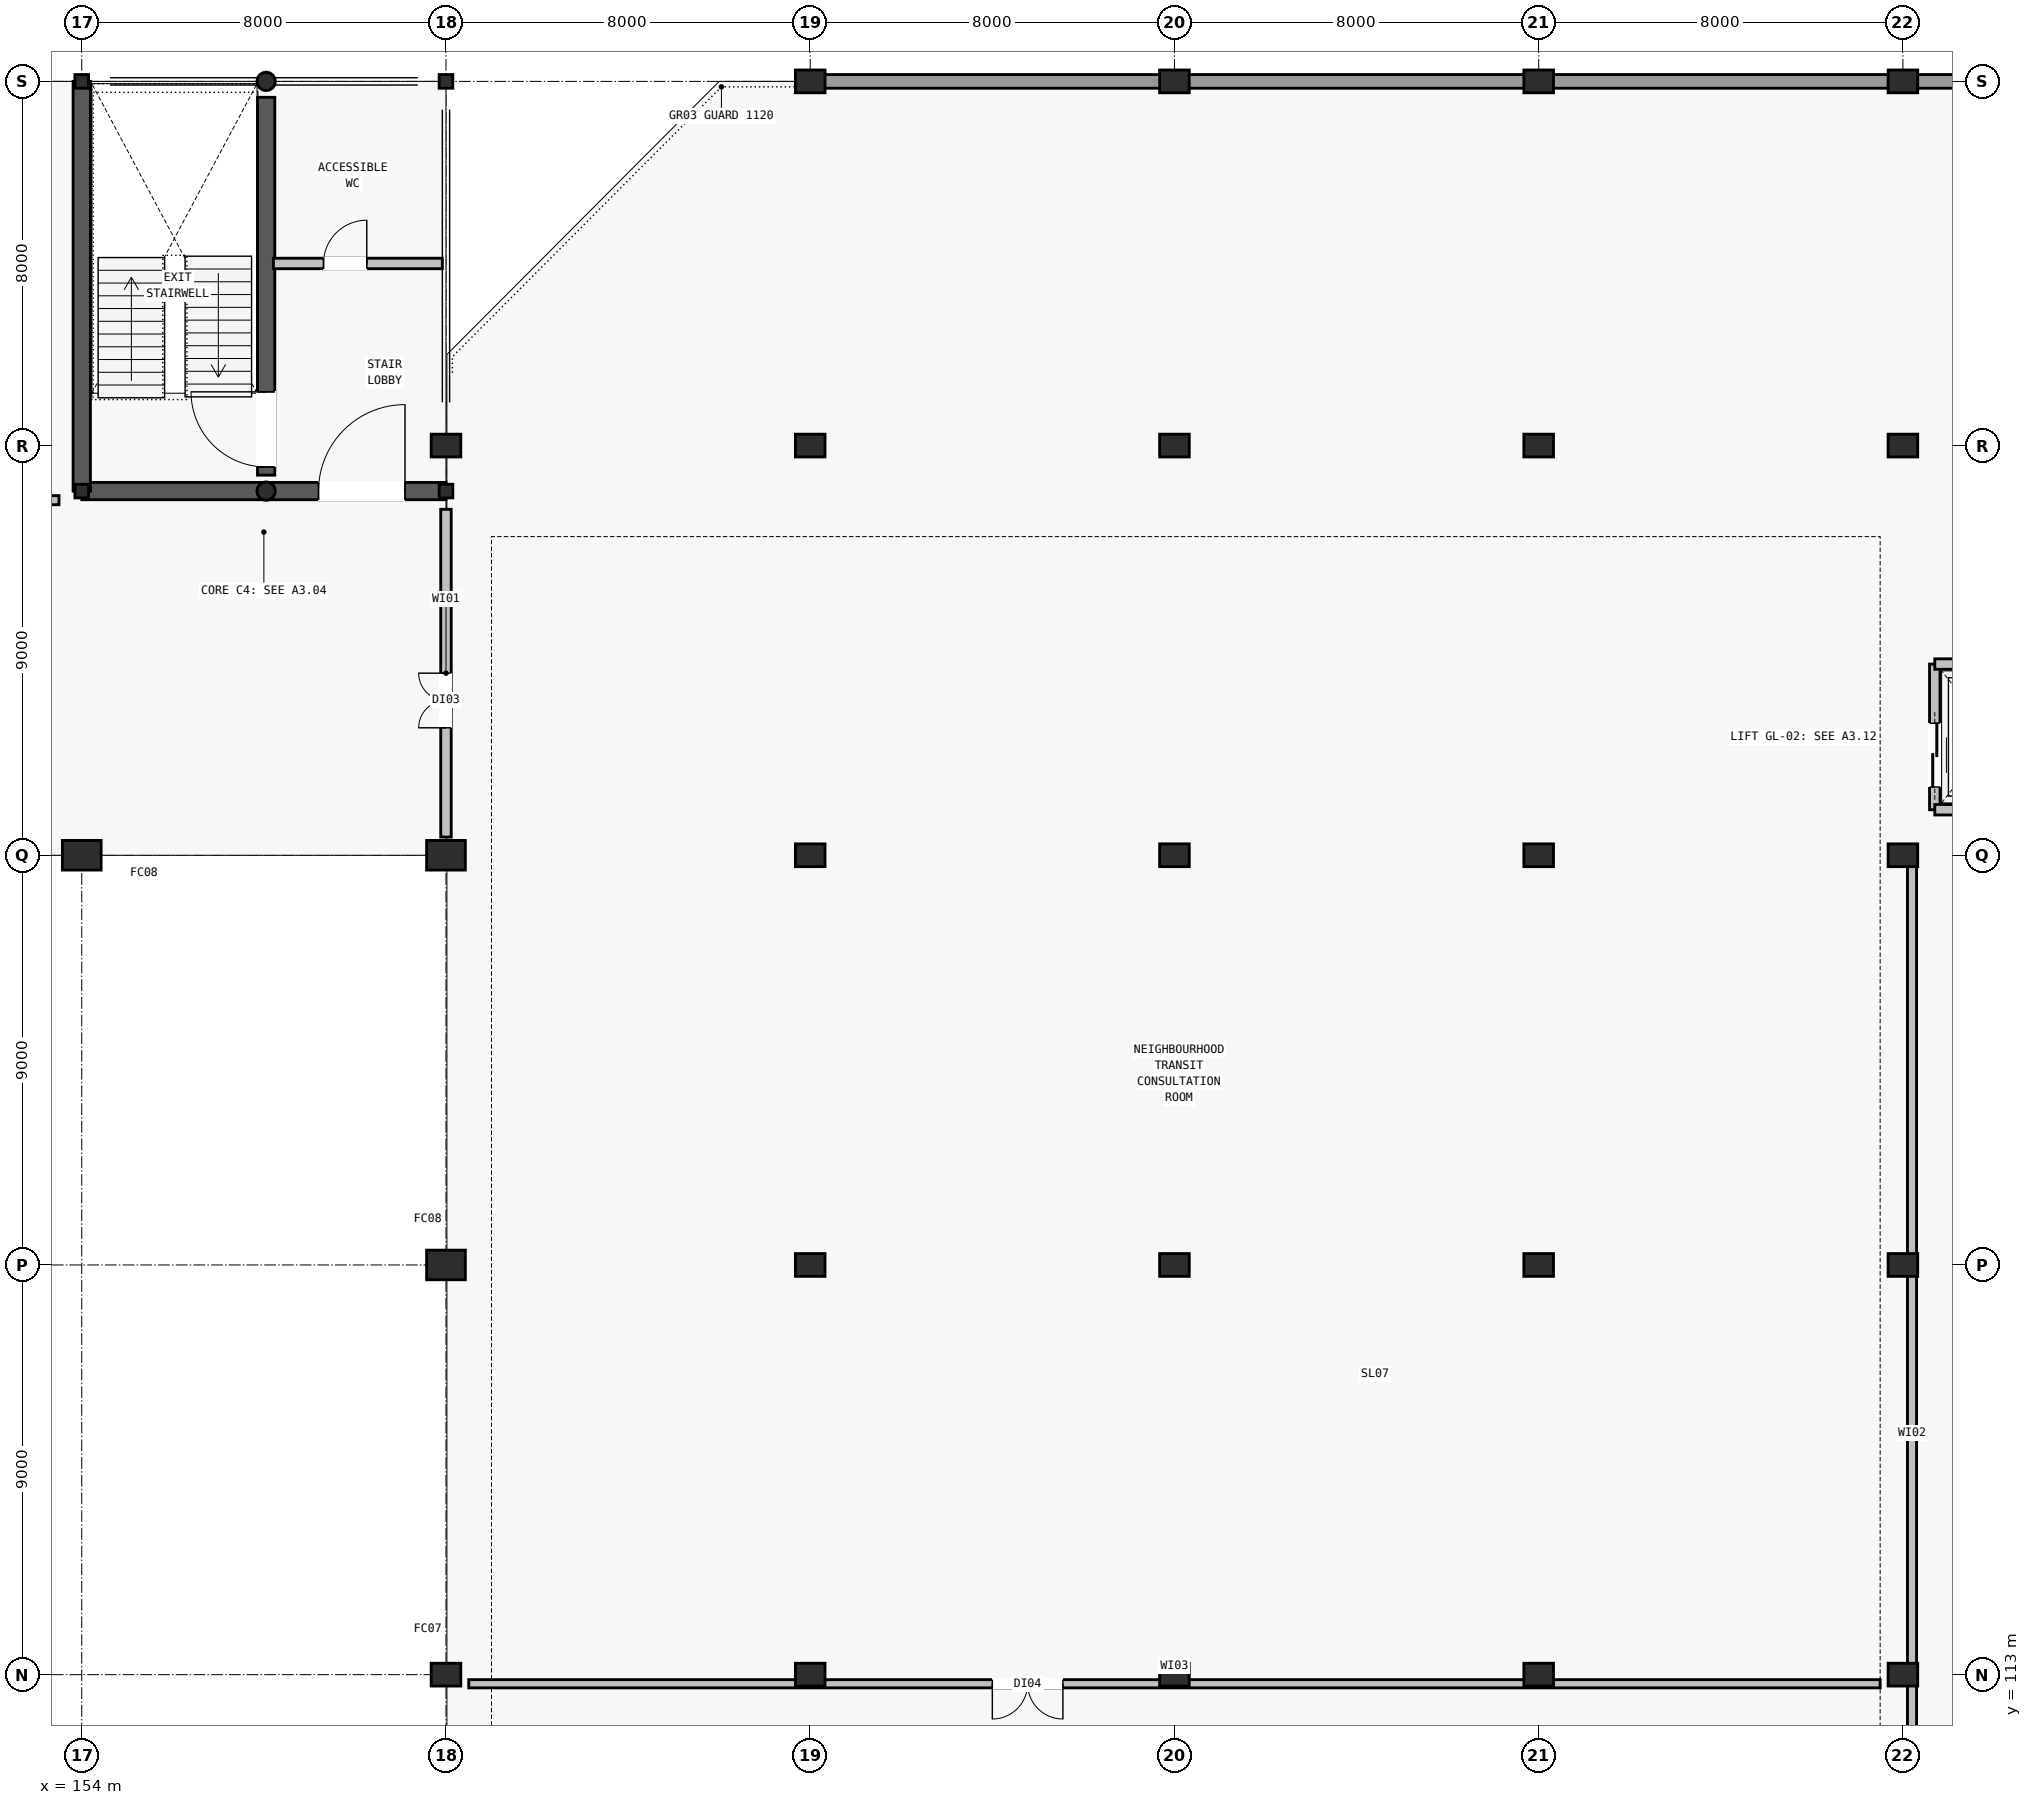
"""IFC4 building model, lengths in metres.
Left out: names, types, materials, properties, quantities, classifications, styles, units other than length and angle.
Written with IfcOpenShell. Run it as: python <this file> out.ifc"""

import sys

from ifc_helpers import new_model, si_unit, direction, frame, frame_2d, origin, origin_2d, place, context, subcontext, project, spatial, rectangle, hollow_circle, i_section, extrude, element, fill, save


model = new_model("IFC4")
c1 = context("Model", 3, precision=1e-05, world=origin(), true_north=direction((0.0, 1.0)))
c2 = subcontext(c1, "Body", "Model", "MODEL_VIEW")
j1 = project(units=[si_unit("LENGTHUNIT", "METRE"), si_unit("PLANEANGLEUNIT", "RADIAN")], contexts=[c1])
p1 = place(None, origin())
s1 = spatial("IfcSite", under=j1, at=p1, CompositionType="ELEMENT")
p2 = place(p1, origin())
s2 = spatial("IfcBuilding", under=s1, at=p2, CompositionType="ELEMENT")
p3 = place(p2, frame((0.0, 0.0, 17.3)))
s3 = spatial("IfcBuildingStorey", under=s2, at=p3, CompositionType="ELEMENT", Elevation=17.3)
for number, where, z_axis, x_axis in (
    (1, (154.0, 148.0, 0.0), (0.0, 0.0, 1.0), (1.0, 0.0, 0.0)),
    (2, (162.0, 148.0, 0.0), (0.0, 0.0, 1.0), (1.0, 0.0, 0.0)),
    (3, (154.0, 139.0, 0.0), (0.0, 0.0, 1.0), (1.0, 0.0, 0.0)),
    (4, (162.0, 139.0, 0.0), (0.0, 0.0, 1.0), (1.0, 0.0, 0.0)),
):
    element("IfcColumn", number, at=place(p3, frame(where, z_axis=z_axis, x_axis=x_axis)), inside=s3, PredefinedType="COLUMN", context=c2, shape_type="SweptSolid", body=[
        extrude(i_section(OverallWidth=0.3, OverallDepth=0.3, WebThickness=0.01, FlangeThickness=0.015, FilletRadius=0.018, at=origin_2d()), origin(), (0.0, 0.0, 1.0), 3.9),
    ])
for number, where, z_axis, x_axis in (
    (5, (158.05, 139.0, 0.0), (0.0, 0.0, 1.0), (1.0, 0.0, 0.0)),
    (6, (158.05, 148.0, 0.0), (0.0, 0.0, 1.0), (1.0, 0.0, 0.0)),
):
    element("IfcColumn", number, at=place(p3, frame(where, z_axis=z_axis, x_axis=x_axis)), inside=s3, PredefinedType="COLUMN", context=c2, shape_type="SweptSolid", body=[
        extrude(hollow_circle(Radius=0.203, WallThickness=0.014, at=origin_2d()), origin(), (0.0, 0.0, 1.0), 3.9),
    ])
for number, where, z_axis, x_axis in (
    (7, (154.0, 131.0, 0.0), (0.0, 0.0, 1.0), (1.0, 0.0, 0.0)),
    (8, (162.0, 122.0, 0.0), (0.0, 0.0, 1.0), (1.0, 0.0, 0.0)),
    (9, (162.0, 131.0, 0.0), (0.0, 0.0, 1.0), (1.0, 0.0, 0.0)),
):
    element("IfcColumn", number, at=place(p3, frame(where, z_axis=z_axis, x_axis=x_axis)), inside=s3, PredefinedType="COLUMN", context=c2, shape_type="SweptSolid", body=[
        extrude(rectangle(XDim=0.85, YDim=0.65, at=origin_2d()), origin(), (0.0, 0.0, 1.0), 3.9),
    ])
for number, where, z_axis, x_axis in (
    (10, (162.0, 113.0, 0.0), (0.0, 0.0, 1.0), (1.0, 0.0, 0.0)),
    (11, (162.0, 140.0, 0.0), (0.0, 0.0, 1.0), (1.0, 0.0, 0.0)),
    (12, (170.0, 113.0, 0.0), (0.0, 0.0, 1.0), (1.0, 0.0, 0.0)),
    (13, (170.0, 122.0, 0.0), (0.0, 0.0, 1.0), (1.0, 0.0, 0.0)),
    (14, (170.0, 131.0, 0.0), (0.0, 0.0, 1.0), (1.0, 0.0, 0.0)),
    (15, (170.0, 140.0, 0.0), (0.0, 0.0, 1.0), (1.0, 0.0, 0.0)),
    (16, (170.0, 148.0, 0.0), (0.0, 0.0, 1.0), (1.0, 0.0, 0.0)),
    (17, (178.0, 113.0, 0.0), (0.0, 0.0, 1.0), (1.0, 0.0, 0.0)),
    (18, (178.0, 122.0, 0.0), (0.0, 0.0, 1.0), (1.0, 0.0, 0.0)),
    (19, (178.0, 131.0, 0.0), (0.0, 0.0, 1.0), (1.0, 0.0, 0.0)),
    (20, (178.0, 140.0, 0.0), (0.0, 0.0, 1.0), (1.0, 0.0, 0.0)),
    (21, (178.0, 148.0, 0.0), (0.0, 0.0, 1.0), (1.0, 0.0, 0.0)),
    (22, (186.0, 113.0, 0.0), (0.0, 0.0, 1.0), (1.0, 0.0, 0.0)),
    (23, (186.0, 122.0, 0.0), (0.0, 0.0, 1.0), (1.0, 0.0, 0.0)),
    (24, (186.0, 131.0, 0.0), (0.0, 0.0, 1.0), (1.0, 0.0, 0.0)),
    (25, (186.0, 140.0, 0.0), (0.0, 0.0, 1.0), (1.0, 0.0, 0.0)),
    (26, (186.0, 148.0, 0.0), (0.0, 0.0, 1.0), (1.0, 0.0, 0.0)),
    (27, (194.0, 113.0, 0.0), (0.0, 0.0, 1.0), (1.0, 0.0, 0.0)),
    (28, (194.0, 122.0, 0.0), (0.0, 0.0, 1.0), (1.0, 0.0, 0.0)),
    (29, (194.0, 131.0, 0.0), (0.0, 0.0, 1.0), (1.0, 0.0, 0.0)),
    (30, (194.0, 140.0, 0.0), (0.0, 0.0, 1.0), (1.0, 0.0, 0.0)),
    (31, (194.0, 148.0, 0.0), (0.0, 0.0, 1.0), (1.0, 0.0, 0.0)),
):
    element("IfcColumn", number, at=place(p3, frame(where, z_axis=z_axis, x_axis=x_axis)), inside=s3, PredefinedType="COLUMN", context=c2, shape_type="SweptSolid", body=[
        extrude(rectangle(XDim=0.65, YDim=0.5, at=origin_2d()), origin(), (0.0, 0.0, 1.0), 3.9),
    ])
for number, where, z_axis, x_axis in (
    (32, (177.695, 148.0, 0.0), (0.0, 0.0, 1.0), (-1.0, 0.0, 0.0)),
    (33, (185.695, 148.0, 0.0), (0.0, 0.0, 1.0), (-1.0, 0.0, 0.0)),
    (34, (193.695, 148.0, 0.0), (0.0, 0.0, 1.0), (-1.0, 0.0, 0.0)),
    (35, (201.695, 148.0, 0.0), (0.0, 0.0, 1.0), (-1.0, 0.0, 0.0)),
):
    element("IfcWall", number, at=place(p3, frame(where, z_axis=z_axis, x_axis=x_axis)), inside=s3, PredefinedType="STANDARD", context=c2, shape_type="SweptSolid", body=[
        extrude(rectangle(XDim=7.39, YDim=0.3, at=frame_2d((3.695, 0.0))), origin(), (0.0, 0.0, 1.0), 2.48),
    ])
p4 = place(p3, frame((154.0, 139.0, 0.0), z_axis=(0.0, 0.0, 1.0), x_axis=(1.0, 0.0, 0.0)))
e36 = element("IfcWall", 36, at=p4, inside=s3, PredefinedType="SHEAR", context=c2, shape_type="SweptSolid", body=[
    extrude(rectangle(XDim=8.0, YDim=0.38, at=frame_2d((4.0, 0.0))), origin(), (0.0, 0.0, 1.0), 3.62),
])
p5 = place(p4, frame((5.2, 0.0, 0.0)))
e37 = element("IfcOpeningElement", 37, at=p5, cuts=e36, PredefinedType="OPENING", context=c2, shape_type="SweptSolid", body=[
    extrude(rectangle(XDim=1.9, YDim=2.3, at=frame_2d((0.95, 1.15))), frame((0.0, 0.2, 0.0), z_axis=(0.0, -1.0, 0.0), x_axis=(1.0, 0.0, 0.0)), (0.0, 0.0, 1.0), 0.4),
])
p6 = place(p3, frame((154.0, 148.0, 0.0), z_axis=(0.0, 0.0, 1.0), x_axis=(0.0, -1.0, 0.0)))
e38 = element("IfcWall", 38, at=p6, inside=s3, PredefinedType="SHEAR", context=c2, shape_type="SweptSolid", body=[
    extrude(rectangle(XDim=9.0, YDim=0.38, at=frame_2d((4.5, 0.0))), origin(), (0.0, 0.0, 1.0), 3.62),
])
p7 = place(p3, frame((158.05, 139.35, 0.0), z_axis=(0.0, 0.0, 1.0), x_axis=(0.0, 1.0, 0.0)))
e39 = element("IfcWall", 39, at=p7, inside=s3, PredefinedType="SHEAR", context=c2, shape_type="SweptSolid", body=[
    extrude(rectangle(XDim=8.3, YDim=0.38, at=frame_2d((4.15, 0.0))), origin(), (0.0, 0.0, 1.0), 3.62),
])
p8 = place(p7, frame((0.18, 0.0, 0.0)))
e40 = element("IfcOpeningElement", 40, at=p8, cuts=e39, PredefinedType="OPENING", context=c2, shape_type="SweptSolid", body=[
    extrude(rectangle(XDim=1.65, YDim=2.2, at=frame_2d((0.825, 1.1))), frame((0.0, 0.2, 0.0), z_axis=(0.0, -1.0, 0.0), x_axis=(1.0, 0.0, 0.0)), (0.0, 0.0, 1.0), 0.4),
])
p9 = place(p3, frame((158.21, 144.0, 0.0), z_axis=(0.0, 0.0, 1.0), x_axis=(1.0, 0.0, 0.0)))
e41 = element("IfcWall", 41, at=p9, inside=s3, PredefinedType="PARTITIONING", context=c2, shape_type="SweptSolid", body=[
    extrude(rectangle(XDim=3.71, YDim=0.23, at=frame_2d((1.855, 0.0))), origin(), (0.0, 0.0, 1.0), 2.48),
])
p10 = place(p9, frame((1.1, 0.0, 0.0)))
e42 = element("IfcOpeningElement", 42, at=p10, cuts=e41, PredefinedType="OPENING", context=c2, shape_type="SweptSolid", body=[
    extrude(rectangle(XDim=0.95, YDim=2.1, at=frame_2d((0.475, 1.05))), frame((0.0, 0.125, 0.0), z_axis=(0.0, -1.0, 0.0), x_axis=(1.0, 0.0, 0.0)), (0.0, 0.0, 1.0), 0.25),
])
p11 = place(p3, frame((194.7, 132.0, 0.0), z_axis=(0.0, 0.0, 1.0), x_axis=(0.0, 1.0, 0.0)))
e43 = element("IfcWall", 43, at=p11, inside=s3, PredefinedType="PARTITIONING", context=c2, shape_type="SweptSolid", body=[
    extrude(rectangle(XDim=3.2, YDim=0.23, at=frame_2d((1.6, 0.0))), origin(), (0.0, 0.0, 1.0), 2.48),
])
p12 = place(p11, frame((0.5, 0.0, 0.0)))
e44 = element("IfcOpeningElement", 44, at=p12, cuts=e43, PredefinedType="OPENING", context=c2, shape_type="SweptSolid", body=[
    extrude(rectangle(XDim=1.4, YDim=2.3, at=frame_2d((0.7, 1.15))), frame((0.0, 0.125, 0.0), z_axis=(0.0, -1.0, 0.0), x_axis=(1.0, 0.0, 0.0)), (0.0, 0.0, 1.0), 0.25),
])
for number, where, z_axis, x_axis in (
    (45, (194.7, 135.2, 0.0), (0.0, 0.0, 1.0), (1.0, 0.0, 0.0)),
    (46, (197.3, 132.0, 0.0), (0.0, 0.0, 1.0), (-1.0, 0.0, 0.0)),
):
    element("IfcWall", number, at=place(p3, frame(where, z_axis=z_axis, x_axis=x_axis)), inside=s3, PredefinedType="PARTITIONING", context=c2, shape_type="SweptSolid", body=[
        extrude(rectangle(XDim=2.6, YDim=0.23, at=frame_2d((1.3, 0.0))), origin(), (0.0, 0.0, 1.0), 2.48),
    ])
p13 = place(p3, frame((162.0, 131.4, 0.0), z_axis=(0.0, 0.0, 1.0), x_axis=(0.0, 1.0, 0.0)))
e47 = element("IfcWall", 47, at=p13, inside=s3, PredefinedType="PARTITIONING", context=c2, shape_type="SweptSolid", body=[
    extrude(rectangle(XDim=7.2, YDim=0.23, at=frame_2d((3.6, 0.0))), origin(), (0.0, 0.0, 1.0), 2.48),
])
p14 = place(p13, frame((2.4, 0.0, 0.0)))
e48 = element("IfcOpeningElement", 48, at=p14, cuts=e47, PredefinedType="OPENING", context=c2, shape_type="SweptSolid", body=[
    extrude(rectangle(XDim=1.2, YDim=2.2, at=frame_2d((0.6, 1.1))), frame((0.0, 0.125, 0.0), z_axis=(0.0, -1.0, 0.0), x_axis=(1.0, 0.0, 0.0)), (0.0, 0.0, 1.0), 0.25),
])
p15 = place(p3, frame((120.5, 138.8, 0.0), z_axis=(0.0, 0.0, 1.0), x_axis=(1.0, 0.0, 0.0)))
e49 = element("IfcWall", 49, at=p15, inside=s3, PredefinedType="PARTITIONING", context=c2, shape_type="SweptSolid", body=[
    extrude(rectangle(XDim=33.0, YDim=0.2, at=frame_2d((16.5, 0.0))), origin(), (0.0, 0.0, 1.0), 2.48),
])
p16 = place(p15, frame((12.0, 0.0, 0.0)))
e50 = element("IfcOpeningElement", 50, at=p16, cuts=e49, PredefinedType="OPENING", context=c2, shape_type="SweptSolid", body=[
    extrude(rectangle(XDim=1.75, YDim=2.25, at=frame_2d((0.875, 1.125))), frame((0.0, 0.11, 0.0), z_axis=(0.0, -1.0, 0.0), x_axis=(1.0, 0.0, 0.0)), (0.0, 0.0, 1.0), 0.22),
])
p17 = place(p3, frame((162.5, 112.8, 0.0), z_axis=(0.0, 0.0, 1.0), x_axis=(1.0, 0.0, 0.0)))
e51 = element("IfcWall", 51, at=p17, inside=s3, PredefinedType="PARTITIONING", context=c2, shape_type="SweptSolid", body=[
    extrude(rectangle(XDim=31.0, YDim=0.18, at=frame_2d((15.5, 0.0))), origin(), (0.0, 0.0, 1.0), 2.48),
])
p18 = place(p17, frame((11.5, 0.0, 0.0)))
e52 = element("IfcOpeningElement", 52, at=p18, cuts=e51, PredefinedType="OPENING", context=c2, shape_type="SweptSolid", body=[
    extrude(rectangle(XDim=1.55, YDim=2.2, at=frame_2d((0.775, 1.1))), frame((0.0, 0.1, 0.0), z_axis=(0.0, -1.0, 0.0), x_axis=(1.0, 0.0, 0.0)), (0.0, 0.0, 1.0), 0.2),
])
p19 = place(p3, frame((194.2, 86.2, 0.0), z_axis=(0.0, 0.0, 1.0), x_axis=(0.0, 1.0, 0.0)))
e53 = element("IfcWall", 53, at=p19, inside=s3, PredefinedType="PARTITIONING", context=c2, shape_type="SweptSolid", body=[
    extrude(rectangle(XDim=45.0, YDim=0.2, at=frame_2d((22.5, 0.0))), origin(), (0.0, 0.0, 1.0), 2.48),
])
p20 = place(p19, frame((13.5, 0.0, 0.0)))
e54 = element("IfcOpeningElement", 54, at=p20, cuts=e53, PredefinedType="OPENING", context=c2, shape_type="SweptSolid", body=[
    extrude(rectangle(XDim=1.75, YDim=2.25, at=frame_2d((0.875, 1.125))), frame((0.0, 0.11, 0.0), z_axis=(0.0, -1.0, 0.0), x_axis=(1.0, 0.0, 0.0)), (0.0, 0.0, 1.0), 0.22),
])
p21 = place(p5, origin())
e55 = element("IfcDoor", 55, at=p21, inside=s3, OperationType="SINGLE_SWING_RIGHT", PredefinedType="DOOR", context=c2, shape_type="SweptSolid", body=[
    extrude(rectangle(XDim=1.9, YDim=2.3, at=frame_2d((0.95, 1.15))), frame((0.0, 0.025, 0.0), z_axis=(0.0, -1.0, 0.0), x_axis=(1.0, 0.0, 0.0)), (0.0, 0.0, 1.0), 0.05),
])
fill(e37, e55)
p22 = place(p8, origin())
e56 = element("IfcDoor", 56, at=p22, inside=s3, OperationType="SINGLE_SWING_RIGHT", PredefinedType="DOOR", context=c2, shape_type="SweptSolid", body=[
    extrude(rectangle(XDim=1.65, YDim=2.2, at=frame_2d((0.825, 1.1))), frame((0.0, 0.025, 0.0), z_axis=(0.0, -1.0, 0.0), x_axis=(1.0, 0.0, 0.0)), (0.0, 0.0, 1.0), 0.05),
])
fill(e40, e56)
p23 = place(p10, origin())
e57 = element("IfcDoor", 57, at=p23, inside=s3, OperationType="SINGLE_SWING_RIGHT", PredefinedType="DOOR", context=c2, shape_type="SweptSolid", body=[
    extrude(rectangle(XDim=0.95, YDim=2.1, at=frame_2d((0.475, 1.05))), frame((0.0, 0.025, 0.0), z_axis=(0.0, -1.0, 0.0), x_axis=(1.0, 0.0, 0.0)), (0.0, 0.0, 1.0), 0.05),
])
fill(e42, e57)
p24 = place(p12, origin())
e58 = element("IfcDoor", 58, at=p24, inside=s3, OperationType="SLIDING_TO_RIGHT", PredefinedType="DOOR", context=c2, shape_type="SweptSolid", body=[
    extrude(rectangle(XDim=1.4, YDim=2.3, at=frame_2d((0.7, 1.15))), frame((0.0, 0.025, 0.0), z_axis=(0.0, -1.0, 0.0), x_axis=(1.0, 0.0, 0.0)), (0.0, 0.0, 1.0), 0.05),
])
fill(e44, e58)
p25 = place(p14, origin())
e59 = element("IfcDoor", 59, at=p25, inside=s3, OperationType="DOUBLE_SWING_LEFT", PredefinedType="DOOR", context=c2, shape_type="SweptSolid", body=[
    extrude(rectangle(XDim=1.2, YDim=2.2, at=frame_2d((0.6, 1.1))), frame((0.0, 0.025, 0.0), z_axis=(0.0, -1.0, 0.0), x_axis=(1.0, 0.0, 0.0)), (0.0, 0.0, 1.0), 0.05),
])
fill(e48, e59)
p26 = place(p18, origin())
e60 = element("IfcDoor", 60, at=p26, inside=s3, OperationType="DOUBLE_SWING_RIGHT", PredefinedType="DOOR", context=c2, shape_type="SweptSolid", body=[
    extrude(rectangle(XDim=1.55, YDim=2.2, at=frame_2d((0.775, 1.1))), frame((0.0, 0.025, 0.0), z_axis=(0.0, -1.0, 0.0), x_axis=(1.0, 0.0, 0.0)), (0.0, 0.0, 1.0), 0.05),
])
fill(e52, e60)
save(model, sys.argv[1])
